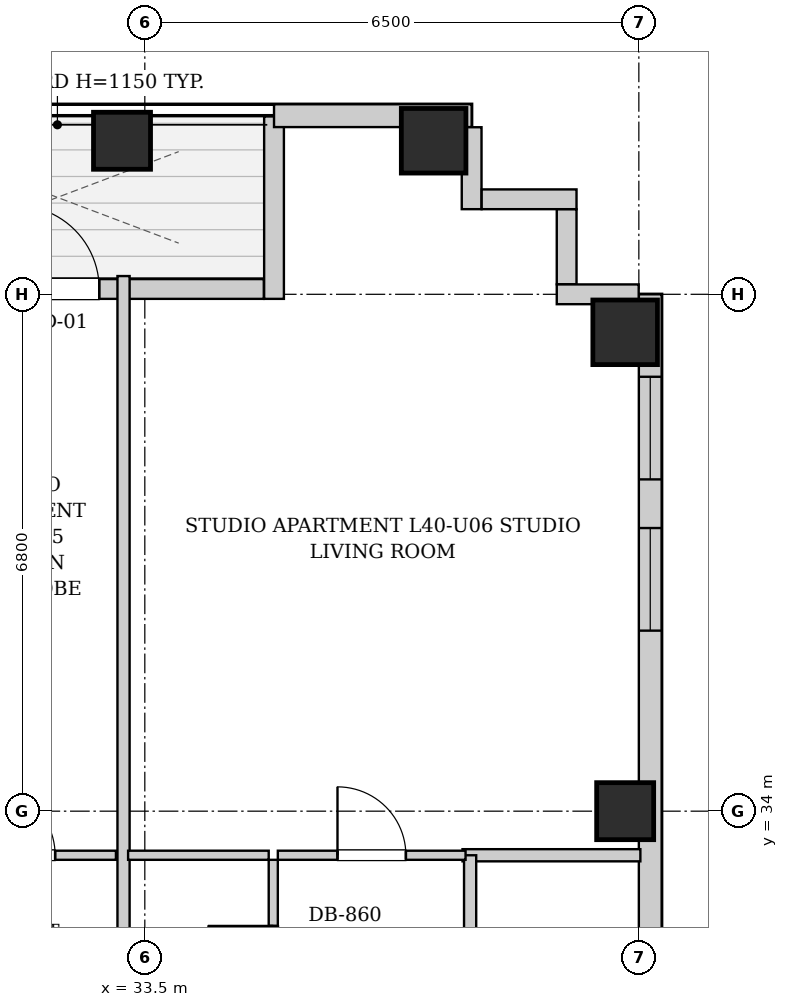
"""IFC4 building model, lengths in metres.
Left out: names, types, materials, properties, quantities, classifications, styles, units other than length and angle.
Written with IfcOpenShell. Run it as: python <this file> out.ifc"""

import sys

from ifc_helpers import new_model, si_unit, direction, frame, frame_2d, origin, origin_2d, place, context, subcontext, project, spatial, rectangle, extrude, element, fill, save


model = new_model("IFC4")
c1 = context("Model", 3, precision=1e-05, world=origin(), true_north=direction((0.0, 1.0)))
c2 = subcontext(c1, "Body", "Model", "MODEL_VIEW")
j1 = project(units=[si_unit("LENGTHUNIT", "METRE"), si_unit("PLANEANGLEUNIT", "RADIAN")], contexts=[c1])
p1 = place(None, origin())
s1 = spatial("IfcSite", under=j1, at=p1, CompositionType="ELEMENT")
p2 = place(p1, origin())
s2 = spatial("IfcBuilding", under=s1, at=p2, CompositionType="ELEMENT")
p3 = place(p2, frame((0.0, 0.0, 140.65)))
s3 = spatial("IfcBuildingStorey", under=s2, at=p3, CompositionType="ELEMENT", Elevation=140.65)
p4 = place(p3, frame((33.2, 42.82, 0.0), z_axis=(0.0, 0.0, 1.0), x_axis=(1.0, 0.0, 0.0)))
e1 = element("IfcColumn", 1, at=p4, inside=s3, PredefinedType="COLUMN", context=c2, shape_type="SweptSolid", body=[
    extrude(rectangle(XDim=0.75, YDim=0.75, at=origin_2d()), origin(), (0.0, 0.0, 1.0), 3.25),
])
p5 = place(p3, frame((37.3, 42.82, 0.0), z_axis=(0.0, 0.0, 1.0), x_axis=(1.0, 0.0, 0.0)))
e2 = element("IfcColumn", 2, at=p5, inside=s3, PredefinedType="COLUMN", context=c2, shape_type="SweptSolid", body=[
    extrude(rectangle(XDim=0.85, YDim=0.85, at=origin_2d()), origin(), (0.0, 0.0, 1.0), 3.25),
])
p6 = place(p3, frame((39.82, 34.0, 0.0), z_axis=(0.0, 0.0, 1.0), x_axis=(1.0, 0.0, 0.0)))
e3 = element("IfcColumn", 3, at=p6, inside=s3, PredefinedType="COLUMN", context=c2, shape_type="SweptSolid", body=[
    extrude(rectangle(XDim=0.75, YDim=0.75, at=origin_2d()), origin(), (0.0, 0.0, 1.0), 3.25),
])
p7 = place(p3, frame((39.82, 40.3, 0.0), z_axis=(0.0, 0.0, 1.0), x_axis=(1.0, 0.0, 0.0)))
e4 = element("IfcColumn", 4, at=p7, inside=s3, PredefinedType="COLUMN", context=c2, shape_type="SweptSolid", body=[
    extrude(rectangle(XDim=0.85, YDim=0.85, at=origin_2d()), origin(), (0.0, 0.0, 1.0), 3.25),
])
p8 = place(p3, frame((29.634, 40.87, 0.0), z_axis=(0.0, 0.0, 1.0), x_axis=(1.0, 0.0, 0.0)))
e5 = element("IfcWall", 5, at=p8, inside=s3, PredefinedType="SOLIDWALL", context=c2, shape_type="SweptSolid", body=[
    extrude(rectangle(XDim=5.432, YDim=0.26, at=frame_2d((2.716, 0.0))), origin(), (0.0, 0.0, 1.0), 2.99),
])
p9 = place(p8, frame((2.166, 0.0, 0.0)))
e6 = element("IfcOpeningElement", 6, at=p9, cuts=e5, PredefinedType="OPENING", context=c2, shape_type="SweptSolid", body=[
    extrude(rectangle(XDim=1.1, YDim=2.0, at=frame_2d((0.55, 1.0))), frame((0.0, 0.14, 0.0), z_axis=(0.0, -1.0, 0.0), x_axis=(1.0, 0.0, 0.0)), (0.0, 0.0, 1.0), 0.28),
])
p10 = place(p8, frame((1.156, 0.0, 0.55)))
e7 = element("IfcOpeningElement", 7, at=p10, cuts=e5, PredefinedType="OPENING", context=c2, shape_type="SweptSolid", body=[
    extrude(rectangle(XDim=0.85, YDim=1.2, at=frame_2d((0.425, 0.6))), frame((0.0, 0.14, 0.0), z_axis=(0.0, -1.0, 0.0), x_axis=(1.0, 0.0, 0.0)), (0.0, 0.0, 1.0), 0.28),
])
p11 = place(p3, frame((35.2, 40.74, 0.0), z_axis=(0.0, 0.0, 1.0), x_axis=(0.0, 1.0, 0.0)))
e8 = element("IfcWall", 8, at=p11, inside=s3, PredefinedType="SOLIDWALL", context=c2, shape_type="SweptSolid", body=[
    extrude(rectangle(XDim=2.4, YDim=0.26, at=frame_2d((1.2, 0.0))), origin(), (0.0, 0.0, 1.0), 2.99),
])
p12 = place(p3, frame((35.2, 43.15, 0.0), z_axis=(0.0, 0.0, 1.0), x_axis=(1.0, 0.0, 0.0)))
e9 = element("IfcWall", 9, at=p12, inside=s3, PredefinedType="SOLIDWALL", context=c2, shape_type="SweptSolid", body=[
    extrude(rectangle(XDim=2.6, YDim=0.3, at=frame_2d((1.3, 0.0))), origin(), (0.0, 0.0, 1.0), 2.99),
])
p13 = place(p3, frame((40.15, 40.8, 0.0), z_axis=(0.0, 0.0, 1.0), x_axis=(0.0, -1.0, 0.0)))
e10 = element("IfcWall", 10, at=p13, inside=s3, PredefinedType="SOLIDWALL", context=c2, shape_type="SweptSolid", body=[
    extrude(rectangle(XDim=34.5, YDim=0.3, at=frame_2d((17.25, 0.0))), origin(), (0.0, 0.0, 1.0), 2.99),
])
p14 = place(p13, frame((31.575, 0.0, 0.55)))
e11 = element("IfcOpeningElement", 11, at=p14, cuts=e10, PredefinedType="OPENING", context=c2, shape_type="SweptSolid", body=[
    extrude(rectangle(XDim=1.35, YDim=1.2, at=frame_2d((0.675, 0.6))), frame((0.0, 0.16, 0.0), z_axis=(0.0, -1.0, 0.0), x_axis=(1.0, 0.0, 0.0)), (0.0, 0.0, 1.0), 0.32),
])
p15 = place(p13, frame((3.075, 0.0, 0.55)))
e12 = element("IfcOpeningElement", 12, at=p15, cuts=e10, PredefinedType="OPENING", context=c2, shape_type="SweptSolid", body=[
    extrude(rectangle(XDim=1.35, YDim=1.2, at=frame_2d((0.675, 0.6))), frame((0.0, 0.16, 0.0), z_axis=(0.0, -1.0, 0.0), x_axis=(1.0, 0.0, 0.0)), (0.0, 0.0, 1.0), 0.32),
])
p16 = place(p13, frame((1.085, 0.0, 0.55)))
e13 = element("IfcOpeningElement", 13, at=p16, cuts=e10, PredefinedType="OPENING", context=c2, shape_type="SweptSolid", body=[
    extrude(rectangle(XDim=1.35, YDim=1.2, at=frame_2d((0.675, 0.6))), frame((0.0, 0.16, 0.0), z_axis=(0.0, -1.0, 0.0), x_axis=(1.0, 0.0, 0.0)), (0.0, 0.0, 1.0), 0.32),
])
p17 = place(p13, frame((22.8, 0.0, 0.55)))
e14 = element("IfcOpeningElement", 14, at=p17, cuts=e10, PredefinedType="OPENING", context=c2, shape_type="SweptSolid", body=[
    extrude(rectangle(XDim=1.35, YDim=1.2, at=frame_2d((0.675, 0.6))), frame((0.0, 0.16, 0.0), z_axis=(0.0, -1.0, 0.0), x_axis=(1.0, 0.0, 0.0)), (0.0, 0.0, 1.0), 0.32),
])
p18 = place(p13, frame((13.425, 0.0, 0.55)))
e15 = element("IfcOpeningElement", 15, at=p18, cuts=e10, PredefinedType="OPENING", context=c2, shape_type="SweptSolid", body=[
    extrude(rectangle(XDim=1.35, YDim=1.2, at=frame_2d((0.675, 0.6))), frame((0.0, 0.16, 0.0), z_axis=(0.0, -1.0, 0.0), x_axis=(1.0, 0.0, 0.0)), (0.0, 0.0, 1.0), 0.32),
])
p19 = place(p3, frame((37.8, 42.998, 0.0), z_axis=(0.0, 0.0, 1.0), x_axis=(0.0, -1.0, 0.0)))
e16 = element("IfcWall", 16, at=p19, inside=s3, PredefinedType="SOLIDWALL", context=c2, shape_type="SweptSolid", body=[
    extrude(rectangle(XDim=1.078, YDim=0.26, at=frame_2d((0.539, 0.0))), origin(), (0.0, 0.0, 1.0), 2.99),
])
p20 = place(p3, frame((37.932, 42.05, 0.0), z_axis=(0.0, 0.0, 1.0), x_axis=(1.0, 0.0, 0.0)))
e17 = element("IfcWall", 17, at=p20, inside=s3, PredefinedType="SOLIDWALL", context=c2, shape_type="SweptSolid", body=[
    extrude(rectangle(XDim=1.248, YDim=0.26, at=frame_2d((0.624, 0.0))), origin(), (0.0, 0.0, 1.0), 2.99),
])
p21 = place(p3, frame((39.05, 41.918, 0.0), z_axis=(0.0, 0.0, 1.0), x_axis=(0.0, -1.0, 0.0)))
e18 = element("IfcWall", 18, at=p21, inside=s3, PredefinedType="SOLIDWALL", context=c2, shape_type="SweptSolid", body=[
    extrude(rectangle(XDim=0.986, YDim=0.26, at=frame_2d((0.493, 0.0))), origin(), (0.0, 0.0, 1.0), 2.99),
])
p22 = place(p3, frame((38.92, 40.8, 0.0), z_axis=(0.0, 0.0, 1.0), x_axis=(1.0, 0.0, 0.0)))
e19 = element("IfcWall", 19, at=p22, inside=s3, PredefinedType="SOLIDWALL", context=c2, shape_type="SweptSolid", body=[
    extrude(rectangle(XDim=1.078, YDim=0.26, at=frame_2d((0.539, 0.0))), origin(), (0.0, 0.0, 1.0), 2.99),
])
p23 = place(p3, frame((30.62, 33.42, 0.0), z_axis=(0.0, 0.0, 1.0), x_axis=(1.0, 0.0, 0.0)))
e20 = element("IfcWall", 20, at=p23, inside=s3, PredefinedType="PARTITIONING", context=c2, shape_type="SweptSolid", body=[
    extrude(rectangle(XDim=2.5, YDim=0.12, at=frame_2d((1.25, 0.0))), origin(), (0.0, 0.0, 1.0), 2.99),
])
p24 = place(p23, frame((0.8, 0.0, 0.0)))
e21 = element("IfcOpeningElement", 21, at=p24, cuts=e20, PredefinedType="OPENING", context=c2, shape_type="SweptSolid", body=[
    extrude(rectangle(XDim=0.9, YDim=2.05, at=frame_2d((0.45, 1.025))), frame((0.0, 0.07, 0.0), z_axis=(0.0, -1.0, 0.0), x_axis=(1.0, 0.0, 0.0)), (0.0, 0.0, 1.0), 0.14),
])
p25 = place(p3, frame((37.68, 33.42, 0.0), z_axis=(0.0, 0.0, 1.0), x_axis=(1.0, 0.0, 0.0)))
e22 = element("IfcWall", 22, at=p25, inside=s3, PredefinedType="PARTITIONING", context=c2, shape_type="SweptSolid", body=[
    extrude(rectangle(XDim=2.34, YDim=0.16, at=frame_2d((1.17, 0.0))), origin(), (0.0, 0.0, 1.0), 2.99),
])
p26 = place(p3, frame((37.78, 30.76, 0.0), z_axis=(0.0, 0.0, 1.0), x_axis=(0.0, 1.0, 0.0)))
e23 = element("IfcWall", 23, at=p26, inside=s3, PredefinedType="PARTITIONING", context=c2, shape_type="SweptSolid", body=[
    extrude(rectangle(XDim=2.66, YDim=0.16, at=frame_2d((1.33, 0.0))), origin(), (0.0, 0.0, 1.0), 2.99),
])
p27 = place(p3, frame((33.22, 30.76, 0.0), z_axis=(0.0, 0.0, 1.0), x_axis=(0.0, 1.0, 0.0)))
e24 = element("IfcWall", 24, at=p27, inside=s3, PredefinedType="PARTITIONING", context=c2, shape_type="SweptSolid", body=[
    extrude(rectangle(XDim=10.28, YDim=0.16, at=frame_2d((5.14, 0.0))), origin(), (0.0, 0.0, 1.0), 2.426),
])
p28 = place(p3, frame((35.19, 30.76, 0.0), z_axis=(0.0, 0.0, 1.0), x_axis=(0.0, 1.0, 0.0)))
e25 = element("IfcWall", 25, at=p28, inside=s3, PredefinedType="PARTITIONING", context=c2, shape_type="SweptSolid", body=[
    extrude(rectangle(XDim=2.6, YDim=0.12, at=frame_2d((1.3, 0.0))), origin(), (0.0, 0.0, 1.0), 2.99),
])
p29 = place(p28, frame((0.87, 0.0, 0.0)))
e26 = element("IfcOpeningElement", 26, at=p29, cuts=e25, PredefinedType="OPENING", context=c2, shape_type="SweptSolid", body=[
    extrude(rectangle(XDim=0.86, YDim=2.05, at=frame_2d((0.43, 1.025))), frame((0.0, 0.07, 0.0), z_axis=(0.0, -1.0, 0.0), x_axis=(1.0, 0.0, 0.0)), (0.0, 0.0, 1.0), 0.14),
])
p30 = place(p3, frame((33.28, 33.42, 0.0), z_axis=(0.0, 0.0, 1.0), x_axis=(1.0, 0.0, 0.0)))
e27 = element("IfcWall", 27, at=p30, inside=s3, PredefinedType="PARTITIONING", context=c2, shape_type="SweptSolid", body=[
    extrude(rectangle(XDim=1.85, YDim=0.12, at=frame_2d((0.925, 0.0))), origin(), (0.0, 0.0, 1.0), 2.99),
])
p31 = place(p3, frame((35.25, 33.42, 0.0), z_axis=(0.0, 0.0, 1.0), x_axis=(1.0, 0.0, 0.0)))
e28 = element("IfcWall", 28, at=p31, inside=s3, PredefinedType="PARTITIONING", context=c2, shape_type="SweptSolid", body=[
    extrude(rectangle(XDim=2.47, YDim=0.12, at=frame_2d((1.235, 0.0))), origin(), (0.0, 0.0, 1.0), 2.99),
])
p32 = place(p31, frame((0.785, 0.0, 0.0)))
e29 = element("IfcOpeningElement", 29, at=p32, cuts=e28, PredefinedType="OPENING", context=c2, shape_type="SweptSolid", body=[
    extrude(rectangle(XDim=0.9, YDim=2.05, at=frame_2d((0.45, 1.025))), frame((0.0, 0.07, 0.0), z_axis=(0.0, -1.0, 0.0), x_axis=(1.0, 0.0, 0.0)), (0.0, 0.0, 1.0), 0.14),
])
p33 = place(p24, origin())
e30 = element("IfcDoor", 30, at=p33, inside=s3, OperationType="SINGLE_SWING_LEFT", PredefinedType="DOOR", context=c2, shape_type="SweptSolid", body=[
    extrude(rectangle(XDim=0.9, YDim=2.05, at=frame_2d((0.45, 1.025))), frame((0.0, 0.025, 0.0), z_axis=(0.0, -1.0, 0.0), x_axis=(1.0, 0.0, 0.0)), (0.0, 0.0, 1.0), 0.05),
])
fill(e21, e30)
p34 = place(p29, origin())
e31 = element("IfcDoor", 31, at=p34, inside=s3, OperationType="SINGLE_SWING_RIGHT", PredefinedType="DOOR", context=c2, shape_type="SweptSolid", body=[
    extrude(rectangle(XDim=0.86, YDim=2.05, at=frame_2d((0.43, 1.025))), frame((0.0, 0.025, 0.0), z_axis=(0.0, -1.0, 0.0), x_axis=(1.0, 0.0, 0.0)), (0.0, 0.0, 1.0), 0.05),
])
fill(e26, e31)
p35 = place(p32, origin())
e32 = element("IfcDoor", 32, at=p35, inside=s3, OperationType="SINGLE_SWING_LEFT", PredefinedType="DOOR", context=c2, shape_type="SweptSolid", body=[
    extrude(rectangle(XDim=0.9, YDim=2.05, at=frame_2d((0.45, 1.025))), frame((0.0, 0.025, 0.0), z_axis=(0.0, -1.0, 0.0), x_axis=(1.0, 0.0, 0.0)), (0.0, 0.0, 1.0), 0.05),
])
fill(e29, e32)
p36 = place(p9, origin())
e33 = element("IfcDoor", 33, at=p36, inside=s3, OperationType="SINGLE_SWING_LEFT", PredefinedType="DOOR", context=c2, shape_type="SweptSolid", body=[
    extrude(rectangle(XDim=1.1, YDim=2.0, at=frame_2d((0.55, 1.0))), frame((0.0, 0.025, 0.0), z_axis=(0.0, -1.0, 0.0), x_axis=(1.0, 0.0, 0.0)), (0.0, 0.0, 1.0), 0.05),
])
fill(e6, e33)
p37 = place(p15, origin())
e34 = element("IfcWindow", 34, at=p37, inside=s3, PartitioningType="SINGLE_PANEL", PredefinedType="WINDOW", context=c2, shape_type="SweptSolid", body=[
    extrude(rectangle(XDim=1.35, YDim=1.2, at=frame_2d((0.675, 0.6))), frame((0.0, 0.03, 0.0), z_axis=(0.0, -1.0, 0.0), x_axis=(1.0, 0.0, 0.0)), (0.0, 0.0, 1.0), 0.06),
])
fill(e12, e34)
p38 = place(p16, origin())
e35 = element("IfcWindow", 35, at=p38, inside=s3, PartitioningType="SINGLE_PANEL", PredefinedType="WINDOW", context=c2, shape_type="SweptSolid", body=[
    extrude(rectangle(XDim=1.35, YDim=1.2, at=frame_2d((0.675, 0.6))), frame((0.0, 0.03, 0.0), z_axis=(0.0, -1.0, 0.0), x_axis=(1.0, 0.0, 0.0)), (0.0, 0.0, 1.0), 0.06),
])
fill(e13, e35)
save(model, sys.argv[1])
